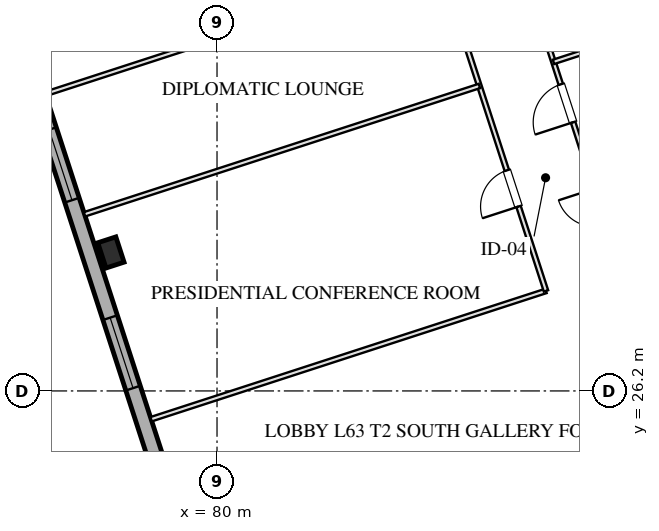
"""IFC4 building model, lengths in metres.
Left out: names, types, materials, properties, quantities, classifications, styles, units other than length and angle.
Written with IfcOpenShell. Run it as: python <this file> out.ifc"""

import sys

from ifc_helpers import new_model, si_unit, direction, frame, frame_2d, origin, origin_2d, place, context, subcontext, project, spatial, rectangle, hollow_rectangle, extrude, element, fill, save


model = new_model("IFC4")
c1 = context("Model", 3, precision=1e-05, world=origin(), true_north=direction((0.0, 1.0)))
c2 = subcontext(c1, "Body", "Model", "MODEL_VIEW")
j1 = project(units=[si_unit("LENGTHUNIT", "METRE"), si_unit("PLANEANGLEUNIT", "RADIAN")], contexts=[c1])
p1 = place(None, origin())
s1 = spatial("IfcSite", under=j1, at=p1, CompositionType="ELEMENT")
p2 = place(p1, origin())
s2 = spatial("IfcBuilding", under=s1, at=p2, CompositionType="ELEMENT")
p3 = place(p2, frame((0.0, 0.0, 234.4)))
s3 = spatial("IfcBuildingStorey", under=s2, at=p3, CompositionType="ELEMENT", Elevation=234.4)
p4 = place(p3, frame((77.208, 29.844, 0.0), z_axis=(0.0, 0.0, 1.0), x_axis=(0.951056516295, 0.309016994375, 0.0)))
e1 = element("IfcColumn", 1, at=p4, inside=s3, PredefinedType="COLUMN", context=c2, shape_type="SweptSolid", body=[
    extrude(hollow_rectangle(XDim=0.5, YDim=0.7, WallThickness=0.025, at=origin_2d()), origin(), (0.0, 0.0, 1.0), 3.201),
])
p5 = place(p3, frame((82.618, 11.414, 0.0), z_axis=(0.0, 0.0, 1.0), x_axis=(-0.309016491071, 0.951056679828, 0.0)))
e2 = element("IfcWall", 2, at=p5, inside=s3, PredefinedType="SOLIDWALL", context=c2, shape_type="SweptSolid", body=[
    extrude(rectangle(XDim=38.4, YDim=0.4, at=frame_2d((19.2, 0.0))), origin(), (0.0, 0.0, 1.0), 2.36),
])
p6 = place(p5, frame((11.825, 0.0, 0.75)))
e3 = element("IfcOpeningElement", 3, at=p6, cuts=e2, PredefinedType="OPENING", context=c2, shape_type="SweptSolid", body=[
    extrude(rectangle(XDim=1.95, YDim=1.21, at=frame_2d((0.975, 0.605))), frame((0.0, 0.21, 0.0), z_axis=(0.0, -1.0, 0.0), x_axis=(1.0, 0.0, 0.0)), (0.0, 0.0, 1.0), 0.42),
])
p7 = place(p5, frame((15.625, 0.0, 0.75)))
e4 = element("IfcOpeningElement", 4, at=p7, cuts=e2, PredefinedType="OPENING", context=c2, shape_type="SweptSolid", body=[
    extrude(rectangle(XDim=1.95, YDim=1.21, at=frame_2d((0.975, 0.605))), frame((0.0, 0.21, 0.0), z_axis=(0.0, -1.0, 0.0), x_axis=(1.0, 0.0, 0.0)), (0.0, 0.0, 1.0), 0.42),
])
p8 = place(p5, frame((20.825, 0.0, 0.75)))
e5 = element("IfcOpeningElement", 5, at=p8, cuts=e2, PredefinedType="OPENING", context=c2, shape_type="SweptSolid", body=[
    extrude(rectangle(XDim=1.95, YDim=1.21, at=frame_2d((0.975, 0.605))), frame((0.0, 0.21, 0.0), z_axis=(0.0, -1.0, 0.0), x_axis=(1.0, 0.0, 0.0)), (0.0, 0.0, 1.0), 0.42),
])
p9 = place(p5, frame((24.625, 0.0, 0.75)))
e6 = element("IfcOpeningElement", 6, at=p9, cuts=e2, PredefinedType="OPENING", context=c2, shape_type="SweptSolid", body=[
    extrude(rectangle(XDim=1.95, YDim=1.21, at=frame_2d((0.975, 0.605))), frame((0.0, 0.21, 0.0), z_axis=(0.0, -1.0, 0.0), x_axis=(1.0, 0.0, 0.0)), (0.0, 0.0, 1.0), 0.42),
])
p10 = place(p3, frame((78.266, 25.456, 0.0), z_axis=(0.0, 0.0, 1.0), x_axis=(0.951056072529, 0.309018360142, 0.0)))
e7 = element("IfcWall", 7, at=p10, inside=s3, PredefinedType="PARTITIONING", context=c2, shape_type="SweptSolid", body=[
    extrude(rectangle(XDim=10.925, YDim=0.12, at=frame_2d((5.462, 0.0))), origin(), (0.0, 0.0, 1.0), 2.925),
])
p11 = place(p3, frame((75.485, 34.015, 0.0), z_axis=(0.0, 0.0, 1.0), x_axis=(0.951058206457, 0.309011792544, 0.0)))
e8 = element("IfcWall", 8, at=p11, inside=s3, PredefinedType="PARTITIONING", context=c2, shape_type="SweptSolid", body=[
    extrude(rectangle(XDim=10.925, YDim=0.12, at=frame_2d((5.462, 0.0))), origin(), (0.0, 0.0, 1.0), 2.925),
])
p12 = place(p3, frame((88.656, 28.832, 0.0), z_axis=(0.0, 0.0, 1.0), x_axis=(-0.309000197986, 0.951061973609, 0.0)))
e9 = element("IfcWall", 9, at=p12, inside=s3, PredefinedType="PARTITIONING", context=c2, shape_type="SweptSolid", body=[
    extrude(rectangle(XDim=9.0, YDim=0.12, at=frame_2d((4.5, 0.0))), origin(), (0.0, 0.0, 1.0), 2.925),
])
p13 = place(p12, frame((2.335, 0.0, 0.0)))
e10 = element("IfcOpeningElement", 10, at=p13, cuts=e9, PredefinedType="OPENING", context=c2, shape_type="SweptSolid", body=[
    extrude(rectangle(XDim=1.0, YDim=2.05, at=frame_2d((0.5, 1.025))), frame((0.0, 0.07, 0.0), z_axis=(0.0, -1.0, 0.0), x_axis=(1.0, 0.0, 0.0)), (0.0, 0.0, 1.0), 0.14),
])
p14 = place(p12, frame((6.835, 0.0, 0.0)))
e11 = element("IfcOpeningElement", 11, at=p14, cuts=e9, PredefinedType="OPENING", context=c2, shape_type="SweptSolid", body=[
    extrude(rectangle(XDim=0.85, YDim=2.05, at=frame_2d((0.425, 1.025))), frame((0.0, 0.07, 0.0), z_axis=(0.0, -1.0, 0.0), x_axis=(1.0, 0.0, 0.0)), (0.0, 0.0, 1.0), 0.14),
])
p15 = place(p3, frame((90.606, 29.465, 0.0), z_axis=(0.0, 0.0, 1.0), x_axis=(-0.309024734286, 0.951054001411, 0.0)))
e12 = element("IfcWall", 12, at=p15, inside=s3, PredefinedType="PARTITIONING", context=c2, shape_type="SweptSolid", body=[
    extrude(rectangle(XDim=9.0, YDim=0.12, at=frame_2d((4.5, 0.0))), origin(), (0.0, 0.0, 1.0), 2.925),
])
p16 = place(p15, frame((1.165, 0.0, 0.0)))
e13 = element("IfcOpeningElement", 13, at=p16, cuts=e12, PredefinedType="OPENING", context=c2, shape_type="SweptSolid", body=[
    extrude(rectangle(XDim=1.0, YDim=2.05, at=frame_2d((0.5, 1.025))), frame((0.0, 0.07, 0.0), z_axis=(0.0, -1.0, 0.0), x_axis=(1.0, 0.0, 0.0)), (0.0, 0.0, 1.0), 0.14),
])
p17 = place(p15, frame((4.0, 0.0, 0.0)))
e14 = element("IfcOpeningElement", 14, at=p17, cuts=e12, PredefinedType="OPENING", context=c2, shape_type="SweptSolid", body=[
    extrude(rectangle(XDim=1.05, YDim=2.05, at=frame_2d((0.525, 1.025))), frame((0.0, 0.07, 0.0), z_axis=(0.0, -1.0, 0.0), x_axis=(1.0, 0.0, 0.0)), (0.0, 0.0, 1.0), 0.14),
])
p18 = place(p15, frame((6.835, 0.0, 0.0)))
e15 = element("IfcOpeningElement", 15, at=p18, cuts=e12, PredefinedType="OPENING", context=c2, shape_type="SweptSolid", body=[
    extrude(rectangle(XDim=1.0, YDim=2.05, at=frame_2d((0.5, 1.025))), frame((0.0, 0.07, 0.0), z_axis=(0.0, -1.0, 0.0), x_axis=(1.0, 0.0, 0.0)), (0.0, 0.0, 1.0), 0.14),
])
p19 = place(p3, frame((76.514, 30.848, 0.0), z_axis=(0.0, 0.0, 1.0), x_axis=(0.951056072529, 0.309018360142, 0.0)))
e16 = element("IfcWall", 16, at=p19, inside=s3, PredefinedType="PARTITIONING", context=c2, shape_type="SweptSolid", body=[
    extrude(rectangle(XDim=10.925, YDim=0.12, at=frame_2d((5.462, 0.0))), origin(), (0.0, 0.0, 1.0), 2.925),
])
p20 = place(p3, frame((88.854, 34.858, 0.0), z_axis=(0.0, 0.0, 1.0), x_axis=(0.951058110432, 0.309012088082, 0.0)))
e17 = element("IfcWall", 17, at=p20, inside=s3, PredefinedType="PARTITIONING", context=c2, shape_type="SweptSolid", body=[
    extrude(rectangle(XDim=14.625, YDim=0.12, at=frame_2d((7.312, 0.0))), origin(), (0.0, 0.0, 1.0), 2.925),
])
p21 = place(p7, origin())
e18 = element("IfcWindow", 18, at=p21, inside=s3, PartitioningType="TRIPLE_PANEL_VERTICAL", PredefinedType="WINDOW", context=c2, shape_type="SweptSolid", body=[
    extrude(rectangle(XDim=1.95, YDim=1.21, at=frame_2d((0.975, 0.605))), frame((0.0, 0.03, 0.0), z_axis=(0.0, -1.0, 0.0), x_axis=(1.0, 0.0, 0.0)), (0.0, 0.0, 1.0), 0.06),
])
fill(e4, e18)
p22 = place(p8, origin())
e19 = element("IfcWindow", 19, at=p22, inside=s3, PartitioningType="TRIPLE_PANEL_VERTICAL", PredefinedType="WINDOW", context=c2, shape_type="SweptSolid", body=[
    extrude(rectangle(XDim=1.95, YDim=1.21, at=frame_2d((0.975, 0.605))), frame((0.0, 0.03, 0.0), z_axis=(0.0, -1.0, 0.0), x_axis=(1.0, 0.0, 0.0)), (0.0, 0.0, 1.0), 0.06),
])
fill(e5, e19)
p23 = place(p13, origin())
e20 = element("IfcDoor", 20, at=p23, inside=s3, OperationType="SINGLE_SWING_LEFT", PredefinedType="DOOR", context=c2, shape_type="SweptSolid", body=[
    extrude(rectangle(XDim=1.0, YDim=2.05, at=frame_2d((0.5, 1.025))), frame((0.0, 0.025, 0.0), z_axis=(0.0, -1.0, 0.0), x_axis=(1.0, 0.0, 0.0)), (0.0, 0.0, 1.0), 0.05),
])
fill(e10, e20)
p24 = place(p17, origin())
e21 = element("IfcDoor", 21, at=p24, inside=s3, OperationType="SINGLE_SWING_LEFT", PredefinedType="DOOR", context=c2, shape_type="SweptSolid", body=[
    extrude(rectangle(XDim=1.05, YDim=2.05, at=frame_2d((0.525, 1.025))), frame((0.0, 0.025, 0.0), z_axis=(0.0, -1.0, 0.0), x_axis=(1.0, 0.0, 0.0)), (0.0, 0.0, 1.0), 0.05),
])
fill(e14, e21)
save(model, sys.argv[1])
